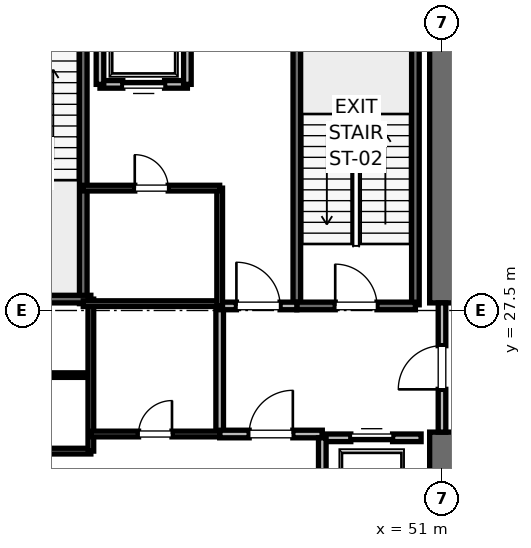
"""IFC4 building model, lengths in metres.
Left out: names, types, materials, properties, quantities, classifications, styles, units other than length and angle.
Written with IfcOpenShell. Run it as: python <this file> out.ifc"""

import sys

from ifc_helpers import new_model, si_unit, direction, frame, frame_2d, origin, place, context, subcontext, project, spatial, rectangle, extrude, element, fill, save


model = new_model("IFC4")
c1 = context("Model", 3, precision=1e-05, world=origin(), true_north=direction((0.0, 1.0)))
c2 = subcontext(c1, "Body", "Model", "MODEL_VIEW")
j1 = project(units=[si_unit("LENGTHUNIT", "METRE"), si_unit("PLANEANGLEUNIT", "RADIAN")], contexts=[c1])
p1 = place(None, origin())
s1 = spatial("IfcSite", under=j1, at=p1, CompositionType="ELEMENT")
p2 = place(p1, origin())
s2 = spatial("IfcBuilding", under=s1, at=p2, CompositionType="ELEMENT")
p3 = place(p2, frame((0.0, 0.0, -9.0)))
s3 = spatial("IfcBuildingStorey", under=s2, at=p3, CompositionType="ELEMENT", Elevation=-9.0)
p4 = place(p3, frame((51.0, 18.5, -0.3), z_axis=(0.0, 0.0, 1.0), x_axis=(0.0, 1.0, 0.0)))
e1 = element("IfcWall", 1, at=p4, inside=s3, PredefinedType="SHEAR", context=c2, shape_type="SweptSolid", body=[
    extrude(rectangle(XDim=5.8, YDim=0.65, at=frame_2d((2.9, 0.0))), origin(), (0.0, 0.0, 1.0), 4.5),
])
p5 = place(p3, frame((51.0, 27.7, -0.3), z_axis=(0.0, 0.0, 1.0), x_axis=(0.0, 1.0, 0.0)))
e2 = element("IfcWall", 2, at=p5, inside=s3, PredefinedType="SHEAR", context=c2, shape_type="SweptSolid", body=[
    extrude(rectangle(XDim=8.8, YDim=0.65, at=frame_2d((4.4, 0.0))), origin(), (0.0, 0.0, 1.0), 4.5),
])
p6 = place(p3, frame((50.3, 27.65, -0.3), z_axis=(0.0, 0.0, 1.0), x_axis=(0.0, 1.0, 0.0)))
e3 = element("IfcWall", 3, at=p6, inside=s3, PredefinedType="SOLIDWALL", context=c2, shape_type="SweptSolid", body=[
    extrude(rectangle(XDim=8.15, YDim=0.2, at=frame_2d((4.075, 0.0))), origin(), (0.0, 0.0, 1.0), 4.5),
])
p7 = place(p3, frame((47.18, 27.62, -0.3), z_axis=(0.0, 0.0, 1.0), x_axis=(0.0, 1.0, 0.0)))
e4 = element("IfcWall", 4, at=p7, inside=s3, PredefinedType="SOLIDWALL", context=c2, shape_type="SweptSolid", body=[
    extrude(rectangle(XDim=8.18, YDim=0.2, at=frame_2d((4.09, 0.0))), origin(), (0.0, 0.0, 1.0), 4.5),
])
p8 = place(p3, frame((47.18, 27.62, -0.3), z_axis=(0.0, 0.0, 1.0), x_axis=(1.0, 0.0, 0.0)))
e5 = element("IfcWall", 5, at=p8, inside=s3, PredefinedType="SOLIDWALL", context=c2, shape_type="SweptSolid", body=[
    extrude(rectangle(XDim=3.12, YDim=0.2, at=frame_2d((1.56, 0.0))), origin(), (0.0, 0.0, 1.0), 4.5),
])
p9 = place(p8, frame((1.01, 0.0, 0.3)))
e6 = element("IfcOpeningElement", 6, at=p9, cuts=e5, PredefinedType="OPENING", context=c2, shape_type="SweptSolid", body=[
    extrude(rectangle(XDim=1.1, YDim=2.15, at=frame_2d((0.55, 1.075))), frame((0.0, 0.1, 0.0), z_axis=(0.0, -1.0, 0.0), x_axis=(1.0, 0.0, 0.0)), (0.0, 0.0, 1.0), 0.2),
])
p10 = place(p3, frame((41.56, 27.68, -0.3), z_axis=(0.0, 0.0, 1.0), x_axis=(0.0, 1.0, 0.0)))
e7 = element("IfcWall", 7, at=p10, inside=s3, PredefinedType="SOLIDWALL", context=c2, shape_type="SweptSolid", body=[
    extrude(rectangle(XDim=8.57, YDim=0.2, at=frame_2d((4.285, 0.0))), origin(), (0.0, 0.0, 1.0), 4.5),
])
p11 = place(p3, frame((38.44, 27.8, -0.3), z_axis=(0.0, 0.0, 1.0), x_axis=(1.0, 0.0, 0.0)))
e8 = element("IfcWall", 8, at=p11, inside=s3, PredefinedType="SOLIDWALL", context=c2, shape_type="SweptSolid", body=[
    extrude(rectangle(XDim=3.32, YDim=0.2, at=frame_2d((1.66, 0.0))), origin(), (0.0, 0.0, 1.0), 4.5),
])
p12 = place(p3, frame((45.15, 24.25, 0.0), z_axis=(0.0, 0.0, 1.0), x_axis=(0.0, 1.0, 0.0)))
e9 = element("IfcWall", 9, at=p12, inside=s3, PredefinedType="PARTITIONING", context=c2, shape_type="SweptSolid", body=[
    extrude(rectangle(XDim=3.37, YDim=0.2, at=frame_2d((1.685, 0.0))), origin(), (0.0, 0.0, 1.0), 4.2),
])
p13 = place(p3, frame((45.15, 24.25, 0.0), z_axis=(0.0, 0.0, 1.0), x_axis=(1.0, 0.0, 0.0)))
e10 = element("IfcWall", 10, at=p13, inside=s3, PredefinedType="PARTITIONING", context=c2, shape_type="SweptSolid", body=[
    extrude(rectangle(XDim=2.7, YDim=0.2, at=frame_2d((1.35, 0.0))), origin(), (0.0, 0.0, 1.0), 4.2),
])
p14 = place(p13, frame((0.775, 0.0, 0.0)))
e11 = element("IfcOpeningElement", 11, at=p14, cuts=e10, PredefinedType="OPENING", context=c2, shape_type="SweptSolid", body=[
    extrude(rectangle(XDim=1.15, YDim=2.2, at=frame_2d((0.575, 1.1))), frame((0.0, 0.1, 0.0), z_axis=(0.0, -1.0, 0.0), x_axis=(1.0, 0.0, 0.0)), (0.0, 0.0, 1.0), 0.2),
])
p15 = place(p3, frame((45.15, 27.62, 0.0), z_axis=(0.0, 0.0, 1.0), x_axis=(1.0, 0.0, 0.0)))
e12 = element("IfcWall", 12, at=p15, inside=s3, PredefinedType="PARTITIONING", context=c2, shape_type="SweptSolid", body=[
    extrude(rectangle(XDim=2.03, YDim=0.2, at=frame_2d((1.015, 0.0))), origin(), (0.0, 0.0, 1.0), 4.2),
])
p16 = place(p15, frame((0.44, 0.0, 0.0)))
e13 = element("IfcOpeningElement", 13, at=p16, cuts=e12, PredefinedType="OPENING", context=c2, shape_type="SweptSolid", body=[
    extrude(rectangle(XDim=1.15, YDim=2.2, at=frame_2d((0.575, 1.1))), frame((0.0, 0.1, 0.0), z_axis=(0.0, -1.0, 0.0), x_axis=(1.0, 0.0, 0.0)), (0.0, 0.0, 1.0), 0.2),
])
p17 = place(p3, frame((51.0, 24.3, 0.0), z_axis=(0.0, 0.0, 1.0), x_axis=(0.0, 1.0, 0.0)))
e14 = element("IfcWall", 14, at=p17, inside=s3, PredefinedType="PARTITIONING", context=c2, shape_type="SweptSolid", body=[
    extrude(rectangle(XDim=3.4, YDim=0.2, at=frame_2d((1.7, 0.0))), origin(), (0.0, 0.0, 1.0), 2.98),
])
p18 = place(p17, frame((1.125, 0.0, 0.0)))
e15 = element("IfcOpeningElement", 15, at=p18, cuts=e14, PredefinedType="OPENING", context=c2, shape_type="SweptSolid", body=[
    extrude(rectangle(XDim=1.15, YDim=2.2, at=frame_2d((0.575, 1.1))), frame((0.0, 0.1, 0.0), z_axis=(0.0, -1.0, 0.0), x_axis=(1.0, 0.0, 0.0)), (0.0, 0.0, 1.0), 0.2),
])
p19 = place(p3, frame((50.45, 24.15, 0.0), z_axis=(0.0, 0.0, 1.0), x_axis=(-1.0, 0.0, 0.0)))
e16 = element("IfcWall", 16, at=p19, inside=s3, PredefinedType="SOLIDWALL", context=c2, shape_type="SweptSolid", body=[
    extrude(rectangle(XDim=2.6, YDim=0.2, at=frame_2d((1.3, 0.0))), origin(), (0.0, 0.0, 1.0), 2.98),
])
p20 = place(p19, frame((0.75, 0.0, 0.0)))
e17 = element("IfcOpeningElement", 17, at=p20, cuts=e16, PredefinedType="OPENING", context=c2, shape_type="SweptSolid", body=[
    extrude(rectangle(XDim=1.1, YDim=2.2, at=frame_2d((0.55, 1.1))), frame((0.0, 0.1, 0.0), z_axis=(0.0, -1.0, 0.0), x_axis=(1.0, 0.0, 0.0)), (0.0, 0.0, 1.0), 0.2),
])
p21 = place(p3, frame((47.85, 24.15, 0.0), z_axis=(0.0, 0.0, 1.0), x_axis=(0.0, -1.0, 0.0)))
e18 = element("IfcWall", 18, at=p21, inside=s3, PredefinedType="SOLIDWALL", context=c2, shape_type="SweptSolid", body=[
    extrude(rectangle(XDim=3.0, YDim=0.2, at=frame_2d((1.5, 0.0))), origin(), (0.0, 0.0, 1.0), 4.2),
])
p22 = place(p3, frame((42.0, 33.45, 0.0), z_axis=(0.0, 0.0, 1.0), x_axis=(1.0, 0.0, 0.0)))
e19 = element("IfcWall", 19, at=p22, inside=s3, PredefinedType="SOLIDWALL", context=c2, shape_type="SweptSolid", body=[
    extrude(rectangle(XDim=2.3, YDim=0.2, at=frame_2d((1.15, 0.0))), origin(), (0.0, 0.0, 1.0), 4.2),
])
p23 = place(p22, frame((0.6, 0.0, 0.0)))
e20 = element("IfcOpeningElement", 20, at=p23, cuts=e19, PredefinedType="OPENING", context=c2, shape_type="SweptSolid", body=[
    extrude(rectangle(XDim=1.1, YDim=2.2, at=frame_2d((0.55, 1.1))), frame((0.0, 0.1, 0.0), z_axis=(0.0, -1.0, 0.0), x_axis=(1.0, 0.0, 0.0)), (0.0, 0.0, 1.0), 0.2),
])
for number, where, z_axis, x_axis in (
    (21, (42.0, 36.05, 0.0), (0.0, 0.0, 1.0), (0.0, -1.0, 0.0)),
    (22, (44.3, 33.45, 0.0), (0.0, 0.0, 1.0), (0.0, 1.0, 0.0)),
):
    element("IfcWall", number, at=place(p3, frame(where, z_axis=z_axis, x_axis=x_axis)), inside=s3, PredefinedType="SOLIDWALL", context=c2, shape_type="SweptSolid", body=[
        extrude(rectangle(XDim=2.6, YDim=0.2, at=frame_2d((1.3, 0.0))), origin(), (0.0, 0.0, 1.0), 2.98),
    ])
p24 = place(p3, frame((39.95, 23.8, 0.0), z_axis=(0.0, 0.0, 1.0), x_axis=(1.0, 0.0, 0.0)))
e23 = element("IfcWall", 23, at=p24, inside=s3, PredefinedType="PARTITIONING", context=c2, shape_type="SweptSolid", body=[
    extrude(rectangle(XDim=1.81, YDim=0.15, at=frame_2d((0.905, 0.0))), origin(), (0.0, 0.0, 1.0), 2.85),
])
p25 = place(p3, frame((39.95, 25.8, 0.0), z_axis=(0.0, 0.0, 1.0), x_axis=(1.0, 0.0, 0.0)))
e24 = element("IfcWall", 24, at=p25, inside=s3, PredefinedType="PARTITIONING", context=c2, shape_type="SweptSolid", body=[
    extrude(rectangle(XDim=1.81, YDim=0.12, at=frame_2d((0.905, 0.0))), origin(), (0.0, 0.0, 1.0), 2.85),
])
p26 = place(p3, frame((41.76, 23.8, 0.0), z_axis=(0.0, 0.0, 1.0), x_axis=(0.0, 1.0, 0.0)))
e25 = element("IfcWall", 25, at=p26, inside=s3, PredefinedType="PARTITIONING", context=c2, shape_type="SweptSolid", body=[
    extrude(rectangle(XDim=4.0, YDim=0.15, at=frame_2d((2.0, 0.0))), origin(), (0.0, 0.0, 1.0), 2.85),
])
p27 = place(p3, frame((41.56, 27.68, 0.0), z_axis=(0.0, 0.0, 1.0), x_axis=(1.0, 0.0, 0.0)))
e26 = element("IfcWall", 26, at=p27, inside=s3, PredefinedType="PARTITIONING", context=c2, shape_type="SweptSolid", body=[
    extrude(rectangle(XDim=3.59, YDim=0.15, at=frame_2d((1.795, 0.0))), origin(), (0.0, 0.0, 1.0), 2.85),
])
p28 = place(p3, frame((41.76, 24.25, 0.0), z_axis=(0.0, 0.0, 1.0), x_axis=(1.0, 0.0, 0.0)))
e27 = element("IfcWall", 27, at=p28, inside=s3, PredefinedType="PARTITIONING", context=c2, shape_type="SweptSolid", body=[
    extrude(rectangle(XDim=3.39, YDim=0.15, at=frame_2d((1.695, 0.0))), origin(), (0.0, 0.0, 1.0), 2.85),
])
p29 = place(p28, frame((1.255, 0.0, 0.0)))
e28 = element("IfcOpeningElement", 28, at=p29, cuts=e27, PredefinedType="OPENING", context=c2, shape_type="SweptSolid", body=[
    extrude(rectangle(XDim=0.88, YDim=2.1, at=frame_2d((0.44, 1.05))), frame((0.0, 0.075, 0.0), z_axis=(0.0, -1.0, 0.0), x_axis=(1.0, 0.0, 0.0)), (0.0, 0.0, 1.0), 0.15),
])
p30 = place(p3, frame((45.15, 27.62, 0.0), z_axis=(0.0, 0.0, 1.0), x_axis=(0.0, 1.0, 0.0)))
e29 = element("IfcWall", 29, at=p30, inside=s3, PredefinedType="PARTITIONING", context=c2, shape_type="SweptSolid", body=[
    extrude(rectangle(XDim=3.1, YDim=0.15, at=frame_2d((1.55, 0.0))), origin(), (0.0, 0.0, 1.0), 2.85),
])
p31 = place(p3, frame((41.56, 30.72, 0.0), z_axis=(0.0, 0.0, 1.0), x_axis=(1.0, 0.0, 0.0)))
e30 = element("IfcWall", 30, at=p31, inside=s3, PredefinedType="PARTITIONING", context=c2, shape_type="SweptSolid", body=[
    extrude(rectangle(XDim=3.59, YDim=0.15, at=frame_2d((1.795, 0.0))), origin(), (0.0, 0.0, 1.0), 2.85),
])
p32 = place(p31, frame((1.355, 0.0, 0.0)))
e31 = element("IfcOpeningElement", 31, at=p32, cuts=e30, PredefinedType="OPENING", context=c2, shape_type="SweptSolid", body=[
    extrude(rectangle(XDim=0.88, YDim=2.1, at=frame_2d((0.44, 1.05))), frame((0.0, 0.075, 0.0), z_axis=(0.0, -1.0, 0.0), x_axis=(1.0, 0.0, 0.0)), (0.0, 0.0, 1.0), 0.15),
])
p33 = place(p9, origin())
e32 = element("IfcDoor", 32, at=p33, inside=s3, OperationType="SINGLE_SWING_LEFT", PredefinedType="DOOR", context=c2, shape_type="SweptSolid", body=[
    extrude(rectangle(XDim=1.1, YDim=2.15, at=frame_2d((0.55, 1.075))), frame((0.0, 0.025, 0.0), z_axis=(0.0, -1.0, 0.0), x_axis=(1.0, 0.0, 0.0)), (0.0, 0.0, 1.0), 0.05),
])
fill(e6, e32)
p34 = place(p14, origin())
e33 = element("IfcDoor", 33, at=p34, inside=s3, OperationType="SINGLE_SWING_RIGHT", PredefinedType="DOOR", context=c2, shape_type="SweptSolid", body=[
    extrude(rectangle(XDim=1.15, YDim=2.2, at=frame_2d((0.575, 1.1))), frame((0.0, 0.025, 0.0), z_axis=(0.0, -1.0, 0.0), x_axis=(1.0, 0.0, 0.0)), (0.0, 0.0, 1.0), 0.05),
])
fill(e11, e33)
p35 = place(p16, origin())
e34 = element("IfcDoor", 34, at=p35, inside=s3, OperationType="SINGLE_SWING_LEFT", PredefinedType="DOOR", context=c2, shape_type="SweptSolid", body=[
    extrude(rectangle(XDim=1.15, YDim=2.2, at=frame_2d((0.575, 1.1))), frame((0.0, 0.025, 0.0), z_axis=(0.0, -1.0, 0.0), x_axis=(1.0, 0.0, 0.0)), (0.0, 0.0, 1.0), 0.05),
])
fill(e13, e34)
p36 = place(p18, origin())
e35 = element("IfcDoor", 35, at=p36, inside=s3, OperationType="SINGLE_SWING_LEFT", PredefinedType="DOOR", context=c2, shape_type="SweptSolid", body=[
    extrude(rectangle(XDim=1.15, YDim=2.2, at=frame_2d((0.575, 1.1))), frame((0.0, 0.025, 0.0), z_axis=(0.0, -1.0, 0.0), x_axis=(1.0, 0.0, 0.0)), (0.0, 0.0, 1.0), 0.05),
])
fill(e15, e35)
p37 = place(p20, origin())
e36 = element("IfcDoor", 36, at=p37, inside=s3, OperationType="SLIDING_TO_RIGHT", PredefinedType="DOOR", context=c2, shape_type="SweptSolid", body=[
    extrude(rectangle(XDim=1.1, YDim=2.2, at=frame_2d((0.55, 1.1))), frame((0.0, 0.025, 0.0), z_axis=(0.0, -1.0, 0.0), x_axis=(1.0, 0.0, 0.0)), (0.0, 0.0, 1.0), 0.05),
])
fill(e17, e36)
p38 = place(p23, origin())
e37 = element("IfcDoor", 37, at=p38, inside=s3, OperationType="SLIDING_TO_RIGHT", PredefinedType="DOOR", context=c2, shape_type="SweptSolid", body=[
    extrude(rectangle(XDim=1.1, YDim=2.2, at=frame_2d((0.55, 1.1))), frame((0.0, 0.025, 0.0), z_axis=(0.0, -1.0, 0.0), x_axis=(1.0, 0.0, 0.0)), (0.0, 0.0, 1.0), 0.05),
])
fill(e20, e37)
p39 = place(p29, origin())
e38 = element("IfcDoor", 38, at=p39, inside=s3, OperationType="SINGLE_SWING_RIGHT", PredefinedType="DOOR", context=c2, shape_type="SweptSolid", body=[
    extrude(rectangle(XDim=0.88, YDim=2.1, at=frame_2d((0.44, 1.05))), frame((0.0, 0.025, 0.0), z_axis=(0.0, -1.0, 0.0), x_axis=(1.0, 0.0, 0.0)), (0.0, 0.0, 1.0), 0.05),
])
fill(e28, e38)
p40 = place(p32, origin())
e39 = element("IfcDoor", 39, at=p40, inside=s3, OperationType="SINGLE_SWING_LEFT", PredefinedType="DOOR", context=c2, shape_type="SweptSolid", body=[
    extrude(rectangle(XDim=0.88, YDim=2.1, at=frame_2d((0.44, 1.05))), frame((0.0, 0.025, 0.0), z_axis=(0.0, -1.0, 0.0), x_axis=(1.0, 0.0, 0.0)), (0.0, 0.0, 1.0), 0.05),
])
fill(e31, e39)
save(model, sys.argv[1])
